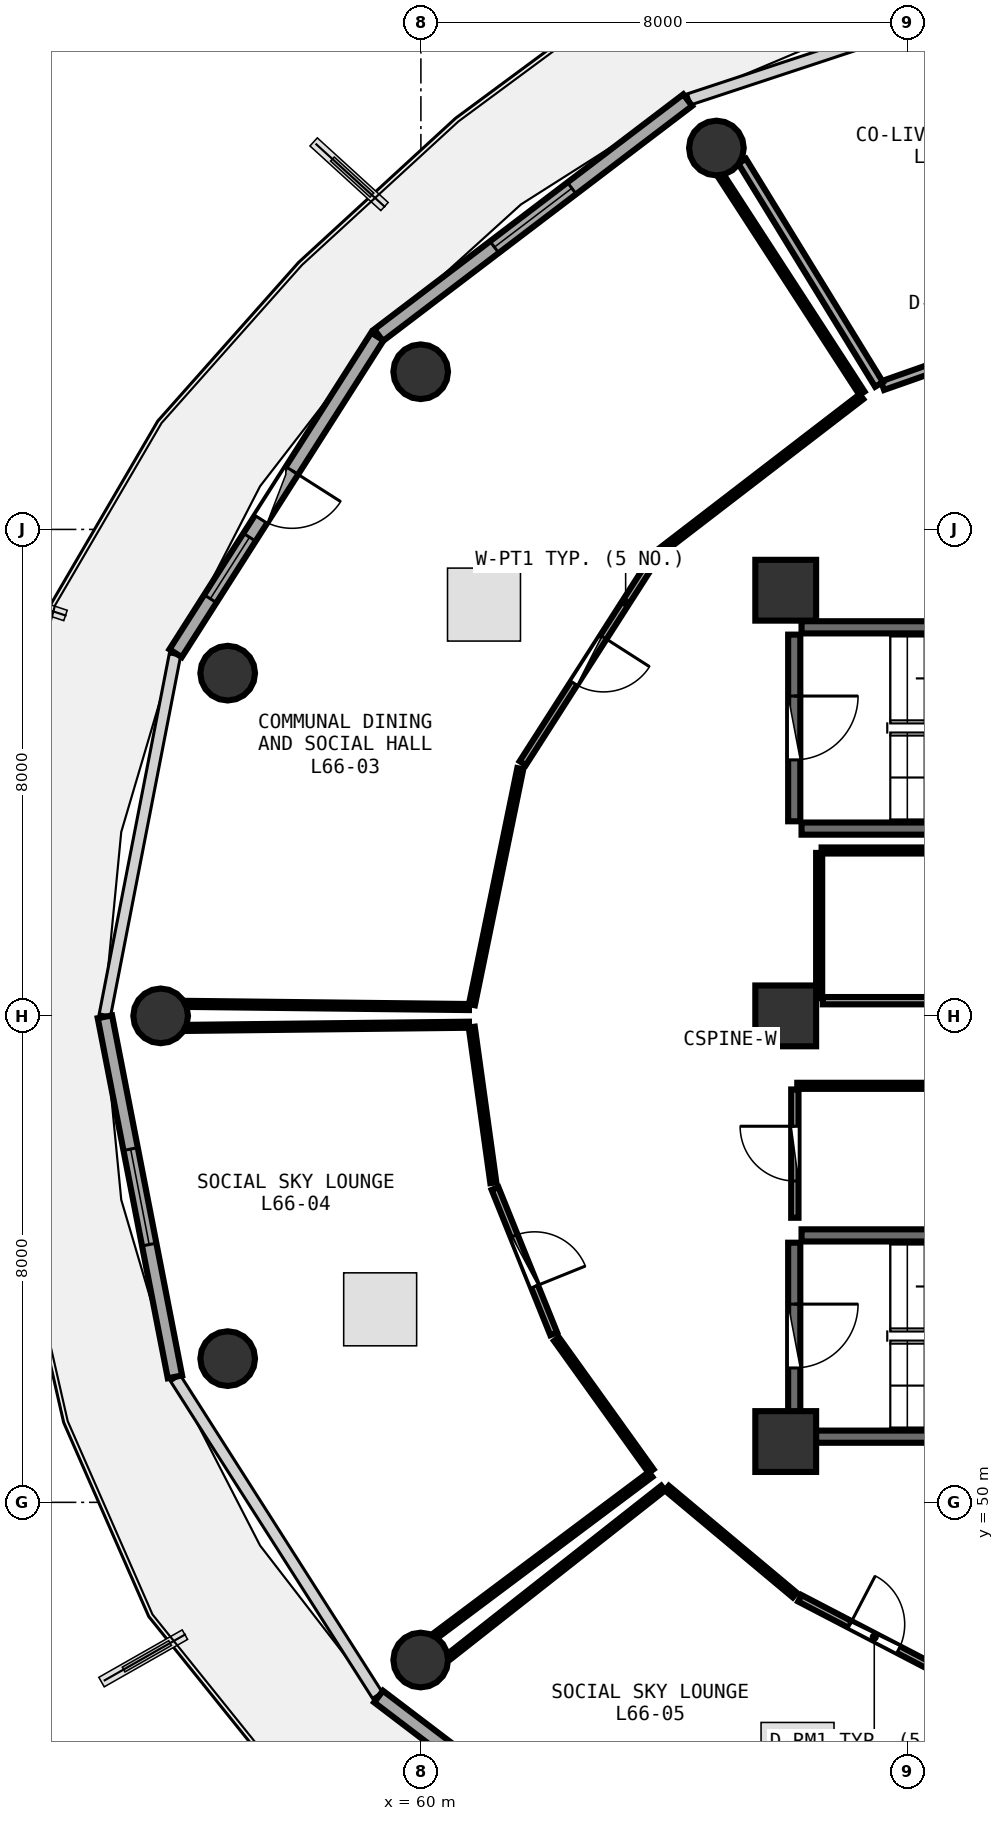
"""IFC4 building model, lengths in metres.
Left out: names, types, materials, properties, quantities, classifications, styles, units other than length and angle.
Written with IfcOpenShell. Run it as: python <this file> out.ifc"""

import sys

from ifc_helpers import new_model, si_unit, direction, frame, frame_2d, origin, origin_2d, place, context, subcontext, project, spatial, rectangle, circle, extrude, element, fill, save


model = new_model("IFC4")
c1 = context("Model", 3, precision=1e-05, world=origin(), true_north=direction((0.0, 1.0)))
c2 = subcontext(c1, "Body", "Model", "MODEL_VIEW")
j1 = project(units=[si_unit("LENGTHUNIT", "METRE"), si_unit("PLANEANGLEUNIT", "RADIAN")], contexts=[c1])
p1 = place(None, origin())
s1 = spatial("IfcSite", under=j1, at=p1, CompositionType="ELEMENT")
p2 = place(p1, origin())
s2 = spatial("IfcBuilding", under=s1, at=p2, CompositionType="ELEMENT")
p3 = place(p2, frame((0.0, 0.0, 259.95)))
s3 = spatial("IfcBuildingStorey", under=s2, at=p3, CompositionType="ELEMENT", Elevation=259.95)
for number, where, z_axis, x_axis in (
    (1, (66.0, 51.0, 0.0), (0.0, 0.0, 1.0), (1.0, 0.0, 0.0)),
    (2, (66.0, 65.0, 0.0), (0.0, 0.0, 1.0), (1.0, 0.0, 0.0)),
    (3, (66.0, 58.0, 0.0), (0.0, 0.0, 1.0), (1.0, 0.0, 0.0)),
):
    element("IfcColumn", number, at=place(p3, frame(where, z_axis=z_axis, x_axis=x_axis)), inside=s3, PredefinedType="PILASTER", context=c2, shape_type="SweptSolid", body=[
        extrude(rectangle(XDim=1.0, YDim=1.0, at=origin_2d()), origin(), (0.0, 0.0, 1.0), 3.75),
    ])
for number, where, z_axis, x_axis in (
    (4, (64.86, 72.272, 0.0), (0.0, 0.0, 1.0), (1.0, 0.0, 0.0)),
    (5, (59.997, 68.593, 0.0), (0.0, 0.0, 1.0), (1.0, 0.0, 0.0)),
    (6, (56.823, 63.636, 0.0), (0.0, 0.0, 1.0), (1.0, 0.0, 0.0)),
    (7, (55.72, 58.0, 0.0), (0.0, 0.0, 1.0), (1.0, 0.0, 0.0)),
    (8, (56.823, 52.364, 0.0), (0.0, 0.0, 1.0), (1.0, 0.0, 0.0)),
    (9, (59.997, 47.407, 0.0), (0.0, 0.0, 1.0), (1.0, 0.0, 0.0)),
):
    element("IfcColumn", number, at=place(p3, frame(where, z_axis=z_axis, x_axis=x_axis)), inside=s3, PredefinedType="COLUMN", context=c2, shape_type="SweptSolid", body=[
        extrude(circle(Radius=0.45, at=origin_2d()), origin(), (0.0, 0.0, 1.0), 3.75),
    ])
p4 = place(p3, frame((64.388, 73.06, 0.0), z_axis=(0.0, 0.0, 1.0), x_axis=(-0.796010444211, -0.605282886514, 0.0)))
e10 = element("IfcWall", 10, at=p4, inside=s3, PredefinedType="SOLIDWALL", context=c2, shape_type="SweptSolid", body=[
    extrude(rectangle(XDim=6.387, YDim=0.24, at=frame_2d((3.194, 0.0))), origin(), (0.0, 0.0, 1.0), 3.475),
])
p5 = place(p4, frame((2.394, 0.0, 0.85)))
e11 = element("IfcOpeningElement", 11, at=p5, cuts=e10, PredefinedType="OPENING", context=c2, shape_type="SweptSolid", body=[
    extrude(rectangle(XDim=1.6, YDim=1.45, at=frame_2d((0.8, 0.725))), frame((0.0, 0.13, 0.0), z_axis=(0.0, -1.0, 0.0), x_axis=(1.0, 0.0, 0.0)), (0.0, 0.0, 1.0), 0.26),
])
p6 = place(p3, frame((59.284, 69.172, 0.0), z_axis=(0.0, 0.0, 1.0), x_axis=(-0.537271968456, -0.843409053728, 0.0)))
e12 = element("IfcWall", 12, at=p6, inside=s3, PredefinedType="SOLIDWALL", context=c2, shape_type="SweptSolid", body=[
    extrude(rectangle(XDim=6.175, YDim=0.24, at=frame_2d((3.087, 0.0))), origin(), (0.0, 0.0, 1.0), 3.475),
])
p7 = place(p6, frame((2.613, 0.0, 0.0)))
e13 = element("IfcOpeningElement", 13, at=p7, cuts=e12, PredefinedType="OPENING", context=c2, shape_type="SweptSolid", body=[
    extrude(rectangle(XDim=0.95, YDim=2.1, at=frame_2d((0.475, 1.05))), frame((0.0, 0.13, 0.0), z_axis=(0.0, -1.0, 0.0), x_axis=(1.0, 0.0, 0.0)), (0.0, 0.0, 1.0), 0.26),
])
p8 = place(p6, frame((3.913, 0.0, 0.85)))
e14 = element("IfcOpeningElement", 14, at=p8, cuts=e12, PredefinedType="OPENING", context=c2, shape_type="SweptSolid", body=[
    extrude(rectangle(XDim=1.2, YDim=1.45, at=frame_2d((0.6, 0.725))), frame((0.0, 0.13, 0.0), z_axis=(0.0, -1.0, 0.0), x_axis=(1.0, 0.0, 0.0)), (0.0, 0.0, 1.0), 0.26),
])
p9 = place(p3, frame((54.803, 57.985, 0.0), z_axis=(0.0, 0.0, 1.0), x_axis=(0.190969309115, -0.981596008028, 0.0)))
e15 = element("IfcWall", 15, at=p9, inside=s3, PredefinedType="SOLIDWALL", context=c2, shape_type="SweptSolid", body=[
    extrude(rectangle(XDim=6.033, YDim=0.24, at=frame_2d((3.017, 0.0))), origin(), (0.0, 0.0, 1.0), 3.475),
])
p10 = place(p9, frame((2.216, 0.0, 0.85)))
e16 = element("IfcOpeningElement", 16, at=p10, cuts=e15, PredefinedType="OPENING", context=c2, shape_type="SweptSolid", body=[
    extrude(rectangle(XDim=1.6, YDim=1.45, at=frame_2d((0.8, 0.725))), frame((0.0, 0.13, 0.0), z_axis=(0.0, -1.0, 0.0), x_axis=(1.0, 0.0, 0.0)), (0.0, 0.0, 1.0), 0.26),
])
p11 = place(p3, frame((59.304, 46.806, 0.0), z_axis=(0.0, 0.0, 1.0), x_axis=(0.796010444211, -0.605282886514, 0.0)))
e17 = element("IfcWall", 17, at=p11, inside=s3, PredefinedType="SOLIDWALL", context=c2, shape_type="SweptSolid", body=[
    extrude(rectangle(XDim=6.387, YDim=0.24, at=frame_2d((3.194, 0.0))), origin(), (0.0, 0.0, 1.0), 3.475),
])
p12 = place(p11, frame((2.394, 0.0, 0.85)))
e18 = element("IfcOpeningElement", 18, at=p12, cuts=e17, PredefinedType="OPENING", context=c2, shape_type="SweptSolid", body=[
    extrude(rectangle(XDim=1.6, YDim=1.45, at=frame_2d((0.8, 0.725))), frame((0.0, 0.13, 0.0), z_axis=(0.0, -1.0, 0.0), x_axis=(1.0, 0.0, 0.0)), (0.0, 0.0, 1.0), 0.26),
])
for number, where, z_axis, x_axis in (
    (19, (66.26, 61.08, 0.0), (0.0, 0.0, 1.0), (1.0, 0.0, 0.0)),
    (20, (73.42, 64.39, 0.0), (0.0, 0.0, 1.0), (-1.0, 0.0, 0.0)),
):
    element("IfcWall", number, at=place(p3, frame(where, z_axis=z_axis, x_axis=x_axis)), inside=s3, PredefinedType="SHEAR", context=c2, shape_type="SweptSolid", body=[
        extrude(rectangle(XDim=7.16, YDim=0.2, at=frame_2d((3.58, 0.0))), origin(), (0.0, 0.0, 1.0), 3.49),
    ])
p13 = place(p3, frame((66.14, 64.27, 0.0), z_axis=(0.0, 0.0, 1.0), x_axis=(0.0, -1.0, 0.0)))
e21 = element("IfcWall", 21, at=p13, inside=s3, PredefinedType="SHEAR", context=c2, shape_type="SweptSolid", body=[
    extrude(rectangle(XDim=3.07, YDim=0.2, at=frame_2d((1.535, 0.0))), origin(), (0.0, 0.0, 1.0), 3.49),
])
p14 = place(p13, frame((1.01, 0.0, 0.0)))
e22 = element("IfcOpeningElement", 22, at=p14, cuts=e21, PredefinedType="OPENING", context=c2, shape_type="SweptSolid", body=[
    extrude(rectangle(XDim=1.05, YDim=2.1, at=frame_2d((0.525, 1.05))), frame((0.0, 0.11, 0.0), z_axis=(0.0, -1.0, 0.0), x_axis=(1.0, 0.0, 0.0)), (0.0, 0.0, 1.0), 0.22),
])
for number, where, z_axis, x_axis in (
    (23, (66.26, 51.08, 0.0), (0.0, 0.0, 1.0), (1.0, 0.0, 0.0)),
    (24, (73.42, 54.39, 0.0), (0.0, 0.0, 1.0), (-1.0, 0.0, 0.0)),
):
    element("IfcWall", number, at=place(p3, frame(where, z_axis=z_axis, x_axis=x_axis)), inside=s3, PredefinedType="SHEAR", context=c2, shape_type="SweptSolid", body=[
        extrude(rectangle(XDim=7.16, YDim=0.2, at=frame_2d((3.58, 0.0))), origin(), (0.0, 0.0, 1.0), 3.49),
    ])
p15 = place(p3, frame((66.14, 54.27, 0.0), z_axis=(0.0, 0.0, 1.0), x_axis=(0.0, -1.0, 0.0)))
e25 = element("IfcWall", 25, at=p15, inside=s3, PredefinedType="SHEAR", context=c2, shape_type="SweptSolid", body=[
    extrude(rectangle(XDim=3.07, YDim=0.2, at=frame_2d((1.535, 0.0))), origin(), (0.0, 0.0, 1.0), 3.49),
])
p16 = place(p15, frame((1.01, 0.0, 0.0)))
e26 = element("IfcOpeningElement", 26, at=p16, cuts=e25, PredefinedType="OPENING", context=c2, shape_type="SweptSolid", body=[
    extrude(rectangle(XDim=1.05, YDim=2.1, at=frame_2d((0.525, 1.05))), frame((0.0, 0.11, 0.0), z_axis=(0.0, -1.0, 0.0), x_axis=(1.0, 0.0, 0.0)), (0.0, 0.0, 1.0), 0.22),
])
p17 = place(p3, frame((66.61, 58.25, 0.0), z_axis=(0.0, 0.0, 1.0), x_axis=(1.0, 0.0, 0.0)))
e27 = element("IfcWall", 27, at=p17, inside=s3, PredefinedType="PARTITIONING", context=c2, shape_type="SweptSolid", body=[
    extrude(rectangle(XDim=5.78, YDim=0.12, at=frame_2d((2.89, 0.0))), origin(), (0.0, 0.0, 1.0), 3.48),
])
p18 = place(p17, frame((2.44, 0.0, 0.0)))
e28 = element("IfcOpeningElement", 28, at=p18, cuts=e27, PredefinedType="OPENING", context=c2, shape_type="SweptSolid", body=[
    extrude(rectangle(XDim=0.9, YDim=2.08, at=frame_2d((0.45, 1.04))), frame((0.0, 0.07, 0.0), z_axis=(0.0, -1.0, 0.0), x_axis=(1.0, 0.0, 0.0)), (0.0, 0.0, 1.0), 0.14),
])
p19 = place(p3, frame((66.15, 54.68, 0.0), z_axis=(0.0, 0.0, 1.0), x_axis=(0.0, 1.0, 0.0)))
e29 = element("IfcWall", 29, at=p19, inside=s3, PredefinedType="PARTITIONING", context=c2, shape_type="SweptSolid", body=[
    extrude(rectangle(XDim=2.11, YDim=0.12, at=frame_2d((1.055, 0.0))), origin(), (0.0, 0.0, 1.0), 2.775),
])
p20 = place(p19, frame((0.605, 0.0, 0.0)))
e30 = element("IfcOpeningElement", 30, at=p20, cuts=e29, PredefinedType="OPENING", context=c2, shape_type="SweptSolid", body=[
    extrude(rectangle(XDim=0.9, YDim=2.08, at=frame_2d((0.45, 1.04))), frame((0.0, 0.07, 0.0), z_axis=(0.0, -1.0, 0.0), x_axis=(1.0, 0.0, 0.0)), (0.0, 0.0, 1.0), 0.14),
])
p21 = place(p3, frame((63.844, 65.542, 0.0), z_axis=(0.0, 0.0, 1.0), x_axis=(-0.539324099435, -0.842098281538, 0.0)))
e31 = element("IfcWall", 31, at=p21, inside=s3, PredefinedType="PARTITIONING", context=c2, shape_type="SweptSolid", body=[
    extrude(rectangle(XDim=4.022, YDim=0.12, at=frame_2d((2.011, 0.0))), origin(), (0.0, 0.0, 1.0), 3.075),
])
p22 = place(p21, frame((1.561, 0.0, 0.0)))
e32 = element("IfcOpeningElement", 32, at=p22, cuts=e31, PredefinedType="OPENING", context=c2, shape_type="SweptSolid", body=[
    extrude(rectangle(XDim=0.9, YDim=2.08, at=frame_2d((0.45, 1.04))), frame((0.0, 0.07, 0.0), z_axis=(0.0, -1.0, 0.0), x_axis=(1.0, 0.0, 0.0)), (0.0, 0.0, 1.0), 0.14),
])
p23 = place(p3, frame((61.219, 55.16, 0.0), z_axis=(0.0, 0.0, 1.0), x_axis=(0.374574284654, -0.927196907499, 0.0)))
e33 = element("IfcWall", 33, at=p23, inside=s3, PredefinedType="PARTITIONING", context=c2, shape_type="SweptSolid", body=[
    extrude(rectangle(XDim=2.576, YDim=0.12, at=frame_2d((1.288, 0.0))), origin(), (0.0, 0.0, 1.0), 3.48),
])
p24 = place(p23, frame((0.838, 0.0, 0.0)))
e34 = element("IfcOpeningElement", 34, at=p24, cuts=e33, PredefinedType="OPENING", context=c2, shape_type="SweptSolid", body=[
    extrude(rectangle(XDim=0.9, YDim=2.08, at=frame_2d((0.45, 1.04))), frame((0.0, 0.07, 0.0), z_axis=(0.0, -1.0, 0.0), x_axis=(1.0, 0.0, 0.0)), (0.0, 0.0, 1.0), 0.14),
])
p25 = place(p3, frame((66.232, 48.422, 0.0), z_axis=(0.0, 0.0, 1.0), x_axis=(0.887021247279, -0.461728607382, 0.0)))
e35 = element("IfcWall", 35, at=p25, inside=s3, PredefinedType="PARTITIONING", context=c2, shape_type="SweptSolid", body=[
    extrude(rectangle(XDim=2.761, YDim=0.12, at=frame_2d((1.38, 0.0))), origin(), (0.0, 0.0, 1.0), 3.235),
])
p26 = place(p25, frame((0.93, 0.0, 0.0)))
e36 = element("IfcOpeningElement", 36, at=p26, cuts=e35, PredefinedType="OPENING", context=c2, shape_type="SweptSolid", body=[
    extrude(rectangle(XDim=0.9, YDim=2.08, at=frame_2d((0.45, 1.04))), frame((0.0, 0.07, 0.0), z_axis=(0.0, -1.0, 0.0), x_axis=(1.0, 0.0, 0.0)), (0.0, 0.0, 1.0), 0.14),
])
p27 = place(p3, frame((72.41, 60.72, 0.0), z_axis=(0.0, 0.0, 1.0), x_axis=(-1.0, 0.0, 0.0)))
e37 = element("IfcWall", 37, at=p27, inside=s3, PredefinedType="PARTITIONING", context=c2, shape_type="SweptSolid", body=[
    extrude(rectangle(XDim=5.82, YDim=0.1, at=frame_2d((2.91, 0.0))), origin(), (0.0, 0.0, 1.0), 3.48),
])
p28 = place(p3, frame((66.55, 60.68, 0.0), z_axis=(0.0, 0.0, 1.0), x_axis=(0.0, -1.0, 0.0)))
e38 = element("IfcWall", 38, at=p28, inside=s3, PredefinedType="PARTITIONING", context=c2, shape_type="SweptSolid", body=[
    extrude(rectangle(XDim=2.39, YDim=0.1, at=frame_2d((1.195, 0.0))), origin(), (0.0, 0.0, 1.0), 3.48),
])
p29 = place(p3, frame((71.76, 56.85, 0.0), z_axis=(0.0, 0.0, 1.0), x_axis=(-1.0, 0.0, 0.0)))
e39 = element("IfcWall", 39, at=p29, inside=s3, PredefinedType="PARTITIONING", context=c2, shape_type="SweptSolid", body=[
    extrude(rectangle(XDim=5.57, YDim=0.1, at=frame_2d((2.785, 0.0))), origin(), (0.0, 0.0, 1.0), 2.775),
])
p30 = place(p3, frame((70.928, 69.538, 0.0), z_axis=(0.0, 0.0, 1.0), x_axis=(-0.943334007166, -0.331844769319, 0.0)))
e40 = element("IfcWall", 40, at=p30, inside=s3, PredefinedType="PARTITIONING", context=c2, shape_type="SweptSolid", body=[
    extrude(rectangle(XDim=3.536, YDim=0.15, at=frame_2d((1.768, 0.0))), origin(), (0.0, 0.0, 1.0), 3.48),
])
p31 = place(p3, frame((67.534, 68.385, 0.0), z_axis=(0.0, 0.0, 1.0), x_axis=(-0.522784059663, 0.852465147066, 0.0)))
e41 = element("IfcWall", 41, at=p31, inside=s3, PredefinedType="PARTITIONING", context=c2, shape_type="SweptSolid", body=[
    extrude(rectangle(XDim=4.306, YDim=0.15, at=frame_2d((2.153, 0.0))), origin(), (0.0, 0.0, 1.0), 3.175),
])
p32 = place(p3, frame((67.244, 68.182, 0.0), z_axis=(0.0, 0.0, 1.0), x_axis=(-0.792820246885, -0.609455540733, 0.0)))
e42 = element("IfcWall", 42, at=p32, inside=s3, PredefinedType="PARTITIONING", context=c2, shape_type="SweptSolid", body=[
    extrude(rectangle(XDim=4.207, YDim=0.1, at=frame_2d((2.104, 0.0))), origin(), (0.0, 0.0, 1.0), 3.075),
])
p33 = place(p3, frame((61.635, 62.066, 0.0), z_axis=(0.0, 0.0, 1.0), x_axis=(-0.200853183429, -0.979621354762, 0.0)))
e43 = element("IfcWall", 43, at=p33, inside=s3, PredefinedType="PARTITIONING", context=c2, shape_type="SweptSolid", body=[
    extrude(rectangle(XDim=3.963, YDim=0.1, at=frame_2d((1.981, 0.0))), origin(), (0.0, 0.0, 1.0), 3.48),
])
p34 = place(p3, frame((60.791, 58.146, 0.0), z_axis=(0.0, 0.0, 1.0), x_axis=(-0.999937174585, 0.01120923205, 0.0)))
e44 = element("IfcWall", 44, at=p34, inside=s3, PredefinedType="PARTITIONING", context=c2, shape_type="SweptSolid", body=[
    extrude(rectangle(XDim=4.639, YDim=0.1, at=frame_2d((2.32, 0.0))), origin(), (0.0, 0.0, 1.0), 3.075),
])
p35 = place(p3, frame((64.942, 71.804, 0.0), z_axis=(0.0, 0.0, 1.0), x_axis=(0.544234825024, -0.838932926539, 0.0)))
e45 = element("IfcWall", 45, at=p35, inside=s3, PredefinedType="PARTITIONING", context=c2, shape_type="SweptSolid", body=[
    extrude(rectangle(XDim=4.249, YDim=0.1, at=frame_2d((2.125, 0.0))), origin(), (0.0, 0.0, 1.0), 3.075),
])
p36 = place(p3, frame((60.836, 57.815, 0.0), z_axis=(0.0, 0.0, 1.0), x_axis=(0.137359832701, -0.990521214493, 0.0)))
e46 = element("IfcWall", 46, at=p36, inside=s3, PredefinedType="PARTITIONING", context=c2, shape_type="SweptSolid", body=[
    extrude(rectangle(XDim=2.584, YDim=0.1, at=frame_2d((1.292, 0.0))), origin(), (0.0, 0.0, 1.0), 3.48),
])
p37 = place(p3, frame((62.23, 52.684, 0.0), z_axis=(0.0, 0.0, 1.0), x_axis=(0.582725386778, -0.812669135383, 0.0)))
e47 = element("IfcWall", 47, at=p37, inside=s3, PredefinedType="PARTITIONING", context=c2, shape_type="SweptSolid", body=[
    extrude(rectangle(XDim=2.669, YDim=0.1, at=frame_2d((1.334, 0.0))), origin(), (0.0, 0.0, 1.0), 3.075),
])
p38 = place(p3, frame((63.777, 50.458, 0.0), z_axis=(0.0, 0.0, 1.0), x_axis=(-0.800384816546, -0.599486568191, 0.0)))
e48 = element("IfcWall", 48, at=p38, inside=s3, PredefinedType="PARTITIONING", context=c2, shape_type="SweptSolid", body=[
    extrude(rectangle(XDim=4.414, YDim=0.1, at=frame_2d((2.207, 0.0))), origin(), (0.0, 0.0, 1.0), 3.175),
])
p39 = place(p3, frame((56.152, 57.802, 0.0), z_axis=(0.0, 0.0, 1.0), x_axis=(0.999937174585, 0.01120923205, 0.0)))
e49 = element("IfcWall", 49, at=p39, inside=s3, PredefinedType="PARTITIONING", context=c2, shape_type="SweptSolid", body=[
    extrude(rectangle(XDim=4.639, YDim=0.1, at=frame_2d((2.32, 0.0))), origin(), (0.0, 0.0, 1.0), 3.075),
])
p40 = place(p3, frame((64.046, 50.234, 0.0), z_axis=(0.0, 0.0, 1.0), x_axis=(0.767022676895, -0.641619991216, 0.0)))
e50 = element("IfcWall", 50, at=p40, inside=s3, PredefinedType="PARTITIONING", context=c2, shape_type="SweptSolid", body=[
    extrude(rectangle(XDim=2.741, YDim=0.1, at=frame_2d((1.371, 0.0))), origin(), (0.0, 0.0, 1.0), 3.075),
])
p41 = place(p3, frame((60.468, 47.468, 0.0), z_axis=(0.0, 0.0, 1.0), x_axis=(0.785736749878, 0.618561039745, 0.0)))
e51 = element("IfcWall", 51, at=p41, inside=s3, PredefinedType="PARTITIONING", context=c2, shape_type="SweptSolid", body=[
    extrude(rectangle(XDim=4.475, YDim=0.1, at=frame_2d((2.237, 0.0))), origin(), (0.0, 0.0, 1.0), 3.075),
])
p42 = place(p5, origin())
e52 = element("IfcWindow", 52, at=p42, inside=s3, PartitioningType="SINGLE_PANEL", PredefinedType="WINDOW", context=c2, shape_type="SweptSolid", body=[
    extrude(rectangle(XDim=1.6, YDim=1.45, at=frame_2d((0.8, 0.725))), frame((0.0, 0.03, 0.0), z_axis=(0.0, -1.0, 0.0), x_axis=(1.0, 0.0, 0.0)), (0.0, 0.0, 1.0), 0.06),
])
fill(e11, e52)
p43 = place(p7, frame((0.95, 0.0, 0.0), z_axis=(0.0, 0.0, 1.0), x_axis=(-1.0, 0.0, 0.0)))
e53 = element("IfcDoor", 53, at=p43, inside=s3, OperationType="SINGLE_SWING_RIGHT", PredefinedType="DOOR", context=c2, shape_type="SweptSolid", body=[
    extrude(rectangle(XDim=0.95, YDim=2.1, at=frame_2d((0.475, 1.05))), frame((0.0, 0.025, 0.0), z_axis=(0.0, -1.0, 0.0), x_axis=(1.0, 0.0, 0.0)), (0.0, 0.0, 1.0), 0.05),
])
fill(e13, e53)
p44 = place(p8, origin())
e54 = element("IfcWindow", 54, at=p44, inside=s3, PartitioningType="SINGLE_PANEL", PredefinedType="WINDOW", context=c2, shape_type="SweptSolid", body=[
    extrude(rectangle(XDim=1.2, YDim=1.45, at=frame_2d((0.6, 0.725))), frame((0.0, 0.03, 0.0), z_axis=(0.0, -1.0, 0.0), x_axis=(1.0, 0.0, 0.0)), (0.0, 0.0, 1.0), 0.06),
])
fill(e14, e54)
p45 = place(p10, origin())
e55 = element("IfcWindow", 55, at=p45, inside=s3, PartitioningType="SINGLE_PANEL", PredefinedType="WINDOW", context=c2, shape_type="SweptSolid", body=[
    extrude(rectangle(XDim=1.6, YDim=1.45, at=frame_2d((0.8, 0.725))), frame((0.0, 0.03, 0.0), z_axis=(0.0, -1.0, 0.0), x_axis=(1.0, 0.0, 0.0)), (0.0, 0.0, 1.0), 0.06),
])
fill(e16, e55)
p46 = place(p14, origin())
e56 = element("IfcDoor", 56, at=p46, inside=s3, OperationType="SINGLE_SWING_LEFT", PredefinedType="DOOR", context=c2, shape_type="SweptSolid", body=[
    extrude(rectangle(XDim=1.05, YDim=2.1, at=frame_2d((0.525, 1.05))), frame((0.0, 0.025, 0.0), z_axis=(0.0, -1.0, 0.0), x_axis=(1.0, 0.0, 0.0)), (0.0, 0.0, 1.0), 0.05),
])
fill(e22, e56)
p47 = place(p16, origin())
e57 = element("IfcDoor", 57, at=p47, inside=s3, OperationType="SINGLE_SWING_LEFT", PredefinedType="DOOR", context=c2, shape_type="SweptSolid", body=[
    extrude(rectangle(XDim=1.05, YDim=2.1, at=frame_2d((0.525, 1.05))), frame((0.0, 0.025, 0.0), z_axis=(0.0, -1.0, 0.0), x_axis=(1.0, 0.0, 0.0)), (0.0, 0.0, 1.0), 0.05),
])
fill(e26, e57)
p48 = place(p20, origin())
e58 = element("IfcDoor", 58, at=p48, inside=s3, OperationType="SINGLE_SWING_RIGHT", PredefinedType="DOOR", context=c2, shape_type="SweptSolid", body=[
    extrude(rectangle(XDim=0.9, YDim=2.08, at=frame_2d((0.45, 1.04))), frame((0.0, 0.025, 0.0), z_axis=(0.0, -1.0, 0.0), x_axis=(1.0, 0.0, 0.0)), (0.0, 0.0, 1.0), 0.05),
])
fill(e30, e58)
p49 = place(p22, origin())
e59 = element("IfcDoor", 59, at=p49, inside=s3, OperationType="SINGLE_SWING_LEFT", PredefinedType="DOOR", context=c2, shape_type="SweptSolid", body=[
    extrude(rectangle(XDim=0.9, YDim=2.08, at=frame_2d((0.45, 1.04))), frame((0.0, 0.025, 0.0), z_axis=(0.0, -1.0, 0.0), x_axis=(1.0, 0.0, 0.0)), (0.0, 0.0, 1.0), 0.05),
])
fill(e32, e59)
p50 = place(p24, origin())
e60 = element("IfcDoor", 60, at=p50, inside=s3, OperationType="SINGLE_SWING_RIGHT", PredefinedType="DOOR", context=c2, shape_type="SweptSolid", body=[
    extrude(rectangle(XDim=0.9, YDim=2.08, at=frame_2d((0.45, 1.04))), frame((0.0, 0.025, 0.0), z_axis=(0.0, -1.0, 0.0), x_axis=(1.0, 0.0, 0.0)), (0.0, 0.0, 1.0), 0.05),
])
fill(e34, e60)
p51 = place(p26, origin())
e61 = element("IfcDoor", 61, at=p51, inside=s3, OperationType="SINGLE_SWING_LEFT", PredefinedType="DOOR", context=c2, shape_type="SweptSolid", body=[
    extrude(rectangle(XDim=0.9, YDim=2.08, at=frame_2d((0.45, 1.04))), frame((0.0, 0.025, 0.0), z_axis=(0.0, -1.0, 0.0), x_axis=(1.0, 0.0, 0.0)), (0.0, 0.0, 1.0), 0.05),
])
fill(e36, e61)
save(model, sys.argv[1])
